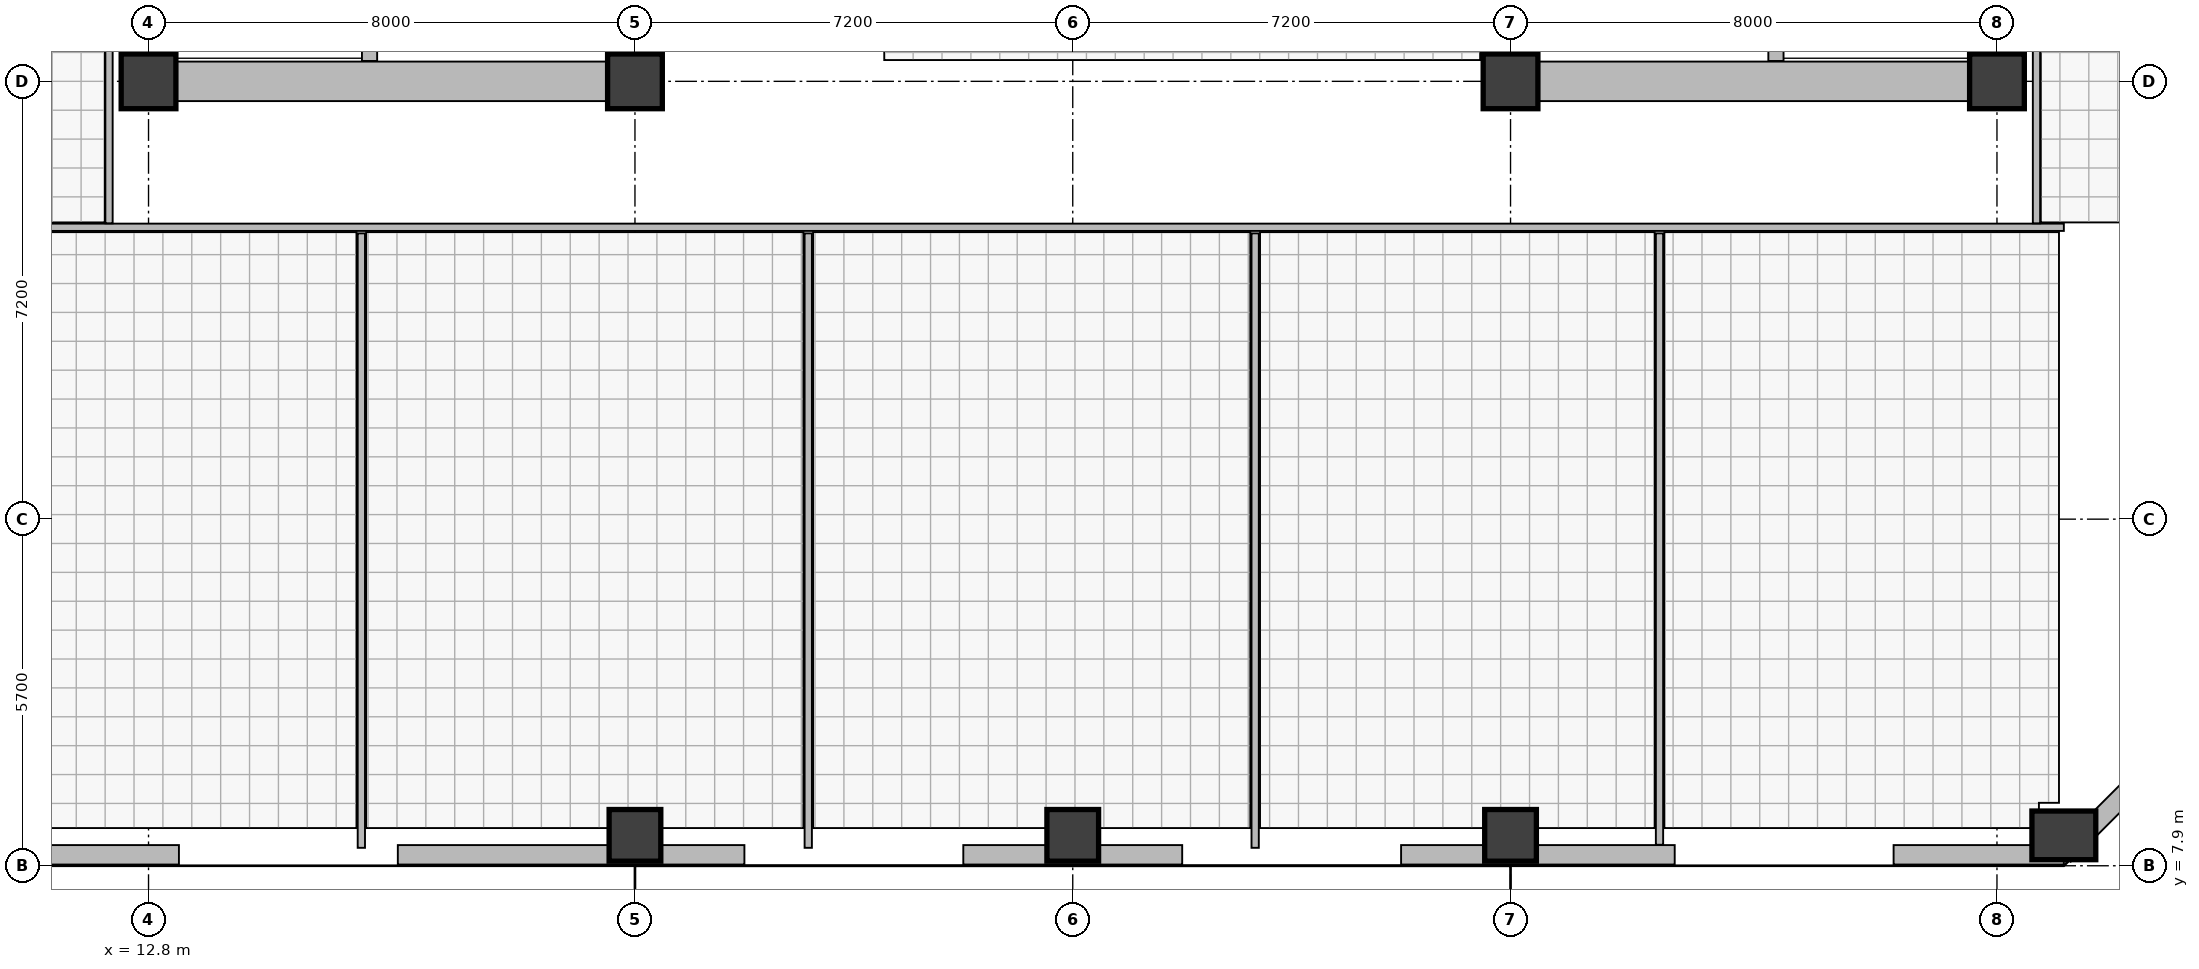
"""IFC4 building model, lengths in metres.
Left out: names, types, materials, properties, quantities, classifications, styles, units other than length and angle.
Written with IfcOpenShell. Run it as: python <this file> out.ifc"""

import sys

from ifc_helpers import new_model, si_unit, direction, frame, frame_2d, origin, origin_2d, place, context, subcontext, project, spatial, rectangle, extrude, element, fill, save


model = new_model("IFC4")
c1 = context("Model", 3, precision=1e-05, world=origin(), true_north=direction((0.0, 1.0)))
c2 = subcontext(c1, "Body", "Model", "MODEL_VIEW")
j1 = project(units=[si_unit("LENGTHUNIT", "METRE"), si_unit("PLANEANGLEUNIT", "RADIAN")], contexts=[c1])
p1 = place(None, origin())
s1 = spatial("IfcSite", under=j1, at=p1, CompositionType="ELEMENT")
p2 = place(p1, origin())
s2 = spatial("IfcBuilding", under=s1, at=p2, CompositionType="ELEMENT")
p3 = place(p2, frame((0.0, 0.0, 202.7)))
s3 = spatial("IfcBuildingStorey", under=s2, at=p3, CompositionType="ELEMENT", Elevation=202.7)
for number, where, z_axis, x_axis in (
    (1, (12.8, 20.8, 0.0), (0.0, 0.0, 1.0), (1.0, 0.0, 0.0)),
    (2, (20.8, 20.8, 0.0), (0.0, 0.0, 1.0), (1.0, 0.0, 0.0)),
    (3, (35.2, 20.8, 0.0), (0.0, 0.0, 1.0), (1.0, 0.0, 0.0)),
    (4, (43.2, 20.8, 0.0), (0.0, 0.0, 1.0), (1.0, 0.0, 0.0)),
):
    element("IfcColumn", number, at=place(p3, frame(where, z_axis=z_axis, x_axis=x_axis)), inside=s3, PredefinedType="COLUMN", context=c2, shape_type="SweptSolid", body=[
        extrude(rectangle(XDim=0.9, YDim=0.9, at=origin_2d()), origin(), (0.0, 0.0, 1.0), 4.8),
    ])
for number, where, z_axis, x_axis in (
    (5, (20.8, 8.4, 0.0), (0.0, 0.0, 1.0), (1.0, 0.0, 0.0)),
    (6, (28.0, 8.4, 0.0), (0.0, 0.0, 1.0), (1.0, 0.0, 0.0)),
    (7, (35.2, 8.4, 0.0), (0.0, 0.0, 1.0), (1.0, 0.0, 0.0)),
):
    element("IfcColumn", number, at=place(p3, frame(where, z_axis=z_axis, x_axis=x_axis)), inside=s3, PredefinedType="COLUMN", context=c2, shape_type="SweptSolid", body=[
        extrude(rectangle(XDim=0.85, YDim=0.85, at=origin_2d()), origin(), (0.0, 0.0, 1.0), 4.8),
    ])
p4 = place(p3, frame((44.3, 8.4, 0.0), z_axis=(0.0, 0.0, 1.0), x_axis=(1.0, 0.0, 0.0)))
e8 = element("IfcColumn", 8, at=p4, inside=s3, PredefinedType="COLUMN", context=c2, shape_type="SweptSolid", body=[
    extrude(rectangle(XDim=0.8, YDim=1.05, at=origin_2d()), origin(), (0.0, 0.0, 1.0), 4.8),
])
p5 = place(p3, frame((44.3, 8.08, 0.0), z_axis=(0.0, 0.0, 1.0), x_axis=(-1.0, 0.0, 0.0)))
e9 = element("IfcWall", 9, at=p5, inside=s3, PredefinedType="STANDARD", context=c2, shape_type="SweptSolid", body=[
    extrude(rectangle(XDim=2.8, YDim=0.32, at=frame_2d((1.4, 0.0))), origin(), (0.0, 0.0, 1.0), 3.735),
])
p6 = place(p3, frame((37.9, 8.08, 0.0), z_axis=(0.0, 0.0, 1.0), x_axis=(-1.0, 0.0, 0.0)))
e10 = element("IfcWall", 10, at=p6, inside=s3, PredefinedType="STANDARD", context=c2, shape_type="SweptSolid", body=[
    extrude(rectangle(XDim=4.5, YDim=0.32, at=frame_2d((2.25, 0.0))), origin(), (0.0, 0.0, 1.0), 3.735),
])
p7 = place(p3, frame((29.8, 8.08, 0.0), z_axis=(0.0, 0.0, 1.0), x_axis=(-1.0, 0.0, 0.0)))
e11 = element("IfcWall", 11, at=p7, inside=s3, PredefinedType="STANDARD", context=c2, shape_type="SweptSolid", body=[
    extrude(rectangle(XDim=3.6, YDim=0.32, at=frame_2d((1.8, 0.0))), origin(), (0.0, 0.0, 1.0), 3.735),
])
p8 = place(p3, frame((22.6, 8.08, 0.0), z_axis=(0.0, 0.0, 1.0), x_axis=(-1.0, 0.0, 0.0)))
e12 = element("IfcWall", 12, at=p8, inside=s3, PredefinedType="STANDARD", context=c2, shape_type="SweptSolid", body=[
    extrude(rectangle(XDim=5.7, YDim=0.32, at=frame_2d((2.85, 0.0))), origin(), (0.0, 0.0, 1.0), 3.735),
])
p9 = place(p3, frame((13.3, 8.08, 0.0), z_axis=(0.0, 0.0, 1.0), x_axis=(-1.0, 0.0, 0.0)))
e13 = element("IfcWall", 13, at=p9, inside=s3, PredefinedType="STANDARD", context=c2, shape_type="SweptSolid", body=[
    extrude(rectangle(XDim=4.0, YDim=0.32, at=frame_2d((2.0, 0.0))), origin(), (0.0, 0.0, 1.0), 3.735),
])
p10 = place(p3, frame((49.12, 12.9, 0.0), z_axis=(0.0, 0.0, 1.0), x_axis=(-0.707124689198, -0.707088872722, 0.0)))
e14 = element("IfcWall", 14, at=p10, inside=s3, PredefinedType="STANDARD", context=c2, shape_type="SweptSolid", body=[
    extrude(rectangle(XDim=6.816, YDim=0.32, at=frame_2d((3.408, 0.0))), origin(), (0.0, 0.0, 1.0), 3.735),
])
p11 = place(p3, frame((12.8, 21.255, 0.0), z_axis=(0.0, 0.0, 1.0), x_axis=(0.0, 1.0, 0.0)))
e15 = element("IfcWall", 15, at=p11, inside=s3, PredefinedType="SHEAR", context=c2, shape_type="SweptSolid", body=[
    extrude(rectangle(XDim=11.89, YDim=0.65, at=frame_2d((5.945, 0.0))), origin(), (0.0, 0.0, 1.0), 4.35),
])
p12 = place(p3, frame((13.255, 20.8, 0.0), z_axis=(0.0, 0.0, 1.0), x_axis=(1.0, 0.0, 0.0)))
e16 = element("IfcWall", 16, at=p12, inside=s3, PredefinedType="SHEAR", context=c2, shape_type="SweptSolid", body=[
    extrude(rectangle(XDim=7.09, YDim=0.65, at=frame_2d((3.545, 0.0))), origin(), (0.0, 0.0, 1.0), 4.35),
])
p13 = place(p3, frame((20.8, 21.255, 0.0), z_axis=(0.0, 0.0, 1.0), x_axis=(0.0, 1.0, 0.0)))
e17 = element("IfcWall", 17, at=p13, inside=s3, PredefinedType="SHEAR", context=c2, shape_type="SweptSolid", body=[
    extrude(rectangle(XDim=3.795, YDim=0.65, at=frame_2d((1.897, 0.0))), origin(), (0.0, 0.0, 1.0), 4.35),
])
p14 = place(p13, frame((1.345, 0.0, 0.0)))
e18 = element("IfcOpeningElement", 18, at=p14, cuts=e17, PredefinedType="OPENING", context=c2, shape_type="SweptSolid", body=[
    extrude(rectangle(XDim=1.2, YDim=2.15, at=frame_2d((0.6, 1.075))), frame((0.0, 0.335, 0.0), z_axis=(0.0, -1.0, 0.0), x_axis=(1.0, 0.0, 0.0)), (0.0, 0.0, 1.0), 0.67),
])
p15 = place(p3, frame((16.435, 21.135, 0.0), z_axis=(0.0, 0.0, 1.0), x_axis=(0.0, 1.0, 0.0)))
e19 = element("IfcWall", 19, at=p15, inside=s3, PredefinedType="SHEAR", context=c2, shape_type="SweptSolid", body=[
    extrude(rectangle(XDim=12.13, YDim=0.25, at=frame_2d((6.065, 0.0))), origin(), (0.0, 0.0, 1.0), 4.35),
])
p16 = place(p15, frame((0.515, 0.0, 0.0)))
e20 = element("IfcOpeningElement", 20, at=p16, cuts=e19, PredefinedType="OPENING", context=c2, shape_type="SweptSolid", body=[
    extrude(rectangle(XDim=1.2, YDim=2.15, at=frame_2d((0.6, 1.075))), frame((0.0, 0.135, 0.0), z_axis=(0.0, -1.0, 0.0), x_axis=(1.0, 0.0, 0.0)), (0.0, 0.0, 1.0), 0.27),
])
p17 = place(p15, frame((2.665, 0.0, 0.0)))
e21 = element("IfcOpeningElement", 21, at=p17, cuts=e19, PredefinedType="OPENING", context=c2, shape_type="SweptSolid", body=[
    extrude(rectangle(XDim=1.15, YDim=2.15, at=frame_2d((0.575, 1.075))), frame((0.0, 0.135, 0.0), z_axis=(0.0, -1.0, 0.0), x_axis=(1.0, 0.0, 0.0)), (0.0, 0.0, 1.0), 0.27),
])
p18 = place(p3, frame((43.2, 21.255, 0.0), z_axis=(0.0, 0.0, 1.0), x_axis=(0.0, 1.0, 0.0)))
e22 = element("IfcWall", 22, at=p18, inside=s3, PredefinedType="SHEAR", context=c2, shape_type="SweptSolid", body=[
    extrude(rectangle(XDim=11.89, YDim=0.65, at=frame_2d((5.945, 0.0))), origin(), (0.0, 0.0, 1.0), 4.35),
])
p19 = place(p3, frame((35.655, 20.8, 0.0), z_axis=(0.0, 0.0, 1.0), x_axis=(1.0, 0.0, 0.0)))
e23 = element("IfcWall", 23, at=p19, inside=s3, PredefinedType="SHEAR", context=c2, shape_type="SweptSolid", body=[
    extrude(rectangle(XDim=7.09, YDim=0.65, at=frame_2d((3.545, 0.0))), origin(), (0.0, 0.0, 1.0), 4.35),
])
p20 = place(p3, frame((35.2, 21.255, 0.0), z_axis=(0.0, 0.0, 1.0), x_axis=(0.0, 1.0, 0.0)))
e24 = element("IfcWall", 24, at=p20, inside=s3, PredefinedType="SHEAR", context=c2, shape_type="SweptSolid", body=[
    extrude(rectangle(XDim=11.89, YDim=0.65, at=frame_2d((5.945, 0.0))), origin(), (0.0, 0.0, 1.0), 4.35),
])
p21 = place(p20, frame((1.345, 0.0, 0.0)))
e25 = element("IfcOpeningElement", 25, at=p21, cuts=e24, PredefinedType="OPENING", context=c2, shape_type="SweptSolid", body=[
    extrude(rectangle(XDim=1.2, YDim=2.15, at=frame_2d((0.6, 1.075))), frame((0.0, 0.335, 0.0), z_axis=(0.0, -1.0, 0.0), x_axis=(1.0, 0.0, 0.0)), (0.0, 0.0, 1.0), 0.67),
])
p22 = place(p20, frame((4.345, 0.0, 0.0)))
e26 = element("IfcOpeningElement", 26, at=p22, cuts=e24, PredefinedType="OPENING", context=c2, shape_type="SweptSolid", body=[
    extrude(rectangle(XDim=1.1, YDim=2.1, at=frame_2d((0.55, 1.05))), frame((0.0, 0.335, 0.0), z_axis=(0.0, -1.0, 0.0), x_axis=(1.0, 0.0, 0.0)), (0.0, 0.0, 1.0), 0.67),
])
p23 = place(p20, frame((6.295, 0.0, 0.0)))
e27 = element("IfcOpeningElement", 27, at=p23, cuts=e24, PredefinedType="OPENING", context=c2, shape_type="SweptSolid", body=[
    extrude(rectangle(XDim=1.1, YDim=2.1, at=frame_2d((0.55, 1.05))), frame((0.0, 0.335, 0.0), z_axis=(0.0, -1.0, 0.0), x_axis=(1.0, 0.0, 0.0)), (0.0, 0.0, 1.0), 0.67),
])
p24 = place(p20, frame((8.245, 0.0, 0.0)))
e28 = element("IfcOpeningElement", 28, at=p24, cuts=e24, PredefinedType="OPENING", context=c2, shape_type="SweptSolid", body=[
    extrude(rectangle(XDim=1.1, YDim=2.1, at=frame_2d((0.55, 1.05))), frame((0.0, 0.335, 0.0), z_axis=(0.0, -1.0, 0.0), x_axis=(1.0, 0.0, 0.0)), (0.0, 0.0, 1.0), 0.67),
])
p25 = place(p20, frame((10.445, 0.0, 0.0)))
e29 = element("IfcOpeningElement", 29, at=p25, cuts=e24, PredefinedType="OPENING", context=c2, shape_type="SweptSolid", body=[
    extrude(rectangle(XDim=1.1, YDim=2.1, at=frame_2d((0.55, 1.05))), frame((0.0, 0.335, 0.0), z_axis=(0.0, -1.0, 0.0), x_axis=(1.0, 0.0, 0.0)), (0.0, 0.0, 1.0), 0.67),
])
p26 = place(p3, frame((39.565, 21.135, 0.0), z_axis=(0.0, 0.0, 1.0), x_axis=(0.0, 1.0, 0.0)))
e30 = element("IfcWall", 30, at=p26, inside=s3, PredefinedType="SHEAR", context=c2, shape_type="SweptSolid", body=[
    extrude(rectangle(XDim=12.13, YDim=0.25, at=frame_2d((6.065, 0.0))), origin(), (0.0, 0.0, 1.0), 4.35),
])
p27 = place(p26, frame((0.515, 0.0, 0.0)))
e31 = element("IfcOpeningElement", 31, at=p27, cuts=e30, PredefinedType="OPENING", context=c2, shape_type="SweptSolid", body=[
    extrude(rectangle(XDim=1.2, YDim=2.15, at=frame_2d((0.6, 1.075))), frame((0.0, 0.135, 0.0), z_axis=(0.0, -1.0, 0.0), x_axis=(1.0, 0.0, 0.0)), (0.0, 0.0, 1.0), 0.27),
])
p28 = place(p26, frame((2.665, 0.0, 0.0)))
e32 = element("IfcOpeningElement", 32, at=p28, cuts=e30, PredefinedType="OPENING", context=c2, shape_type="SweptSolid", body=[
    extrude(rectangle(XDim=1.15, YDim=2.15, at=frame_2d((0.575, 1.075))), frame((0.0, 0.135, 0.0), z_axis=(0.0, -1.0, 0.0), x_axis=(1.0, 0.0, 0.0)), (0.0, 0.0, 1.0), 0.27),
])
p29 = place(p3, frame((9.3, 18.4, 0.0), z_axis=(0.0, 0.0, 1.0), x_axis=(1.0, 0.0, 0.0)))
e33 = element("IfcWall", 33, at=p29, inside=s3, PredefinedType="PARTITIONING", context=c2, shape_type="SweptSolid", body=[
    extrude(rectangle(XDim=35.0, YDim=0.12, at=frame_2d((17.5, 0.0))), origin(), (0.0, 0.0, 1.0), 4.35),
])
p30 = place(p29, frame((2.2, 0.0, 0.0)))
e34 = element("IfcOpeningElement", 34, at=p30, cuts=e33, PredefinedType="OPENING", context=c2, shape_type="SweptSolid", body=[
    extrude(rectangle(XDim=1.0, YDim=2.1, at=frame_2d((0.5, 1.05))), frame((0.0, 0.07, 0.0), z_axis=(0.0, -1.0, 0.0), x_axis=(1.0, 0.0, 0.0)), (0.0, 0.0, 1.0), 0.14),
])
p31 = place(p29, frame((9.2, 0.0, 0.0)))
e35 = element("IfcOpeningElement", 35, at=p31, cuts=e33, PredefinedType="OPENING", context=c2, shape_type="SweptSolid", body=[
    extrude(rectangle(XDim=1.0, YDim=2.1, at=frame_2d((0.5, 1.05))), frame((0.0, 0.07, 0.0), z_axis=(0.0, -1.0, 0.0), x_axis=(1.0, 0.0, 0.0)), (0.0, 0.0, 1.0), 0.14),
])
p32 = place(p29, frame((16.55, 0.0, 0.0)))
e36 = element("IfcOpeningElement", 36, at=p32, cuts=e33, PredefinedType="OPENING", context=c2, shape_type="SweptSolid", body=[
    extrude(rectangle(XDim=1.0, YDim=2.1, at=frame_2d((0.5, 1.05))), frame((0.0, 0.07, 0.0), z_axis=(0.0, -1.0, 0.0), x_axis=(1.0, 0.0, 0.0)), (0.0, 0.0, 1.0), 0.14),
])
p33 = place(p29, frame((23.9, 0.0, 0.0)))
e37 = element("IfcOpeningElement", 37, at=p33, cuts=e33, PredefinedType="OPENING", context=c2, shape_type="SweptSolid", body=[
    extrude(rectangle(XDim=1.0, YDim=2.1, at=frame_2d((0.5, 1.05))), frame((0.0, 0.07, 0.0), z_axis=(0.0, -1.0, 0.0), x_axis=(1.0, 0.0, 0.0)), (0.0, 0.0, 1.0), 0.14),
])
p34 = place(p29, frame((30.55, 0.0, 0.0)))
e38 = element("IfcOpeningElement", 38, at=p34, cuts=e33, PredefinedType="OPENING", context=c2, shape_type="SweptSolid", body=[
    extrude(rectangle(XDim=1.0, YDim=2.1, at=frame_2d((0.5, 1.05))), frame((0.0, 0.07, 0.0), z_axis=(0.0, -1.0, 0.0), x_axis=(1.0, 0.0, 0.0)), (0.0, 0.0, 1.0), 0.14),
])
p35 = place(p3, frame((16.3, 8.195, 0.0), z_axis=(0.0, 0.0, 1.0), x_axis=(0.0, 1.0, 0.0)))
e39 = element("IfcWall", 39, at=p35, inside=s3, PredefinedType="PARTITIONING", context=c2, shape_type="SweptSolid", body=[
    extrude(rectangle(XDim=10.105, YDim=0.12, at=frame_2d((5.052, 0.0))), origin(), (0.0, 0.0, 1.0), 3.785),
])
for number, where, z_axis, x_axis in (
    (40, (23.65, 8.195, 0.0), (0.0, 0.0, 1.0), (0.0, 1.0, 0.0)),
    (41, (31.0, 8.195, 0.0), (0.0, 0.0, 1.0), (0.0, 1.0, 0.0)),
):
    element("IfcWall", number, at=place(p3, frame(where, z_axis=z_axis, x_axis=x_axis)), inside=s3, PredefinedType="PARTITIONING", context=c2, shape_type="SweptSolid", body=[
        extrude(rectangle(XDim=10.105, YDim=0.12, at=frame_2d((5.052, 0.0))), origin(), (0.0, 0.0, 1.0), 4.35),
    ])
p36 = place(p3, frame((37.65, 8.245, 0.0), z_axis=(0.0, 0.0, 1.0), x_axis=(0.0, 1.0, 0.0)))
e42 = element("IfcWall", 42, at=p36, inside=s3, PredefinedType="PARTITIONING", context=c2, shape_type="SweptSolid", body=[
    extrude(rectangle(XDim=10.055, YDim=0.12, at=frame_2d((5.027, 0.0))), origin(), (0.0, 0.0, 1.0), 4.35),
])
p37 = place(p3, frame((12.15, 18.465, 0.0), z_axis=(0.0, 0.0, 1.0), x_axis=(0.0, 1.0, 0.0)))
e43 = element("IfcWall", 43, at=p37, inside=s3, PredefinedType="PARTITIONING", context=c2, shape_type="SweptSolid", body=[
    extrude(rectangle(XDim=17.67, YDim=0.12, at=frame_2d((8.835, 0.0))), origin(), (0.0, 0.0, 1.0), 4.35),
])
p38 = place(p37, frame((0.385, 0.0, 0.0)))
e44 = element("IfcOpeningElement", 44, at=p38, cuts=e43, PredefinedType="OPENING", context=c2, shape_type="SweptSolid", body=[
    extrude(rectangle(XDim=1.1, YDim=2.15, at=frame_2d((0.55, 1.075))), frame((0.0, 0.07, 0.0), z_axis=(0.0, -1.0, 0.0), x_axis=(1.0, 0.0, 0.0)), (0.0, 0.0, 1.0), 0.14),
])
p39 = place(p3, frame((43.85, 18.465, 0.0), z_axis=(0.0, 0.0, 1.0), x_axis=(0.0, 1.0, 0.0)))
e45 = element("IfcWall", 45, at=p39, inside=s3, PredefinedType="PARTITIONING", context=c2, shape_type="SweptSolid", body=[
    extrude(rectangle(XDim=17.67, YDim=0.12, at=frame_2d((8.835, 0.0))), origin(), (0.0, 0.0, 1.0), 4.35),
])
p40 = place(p39, frame((0.385, 0.0, 0.0)))
e46 = element("IfcOpeningElement", 46, at=p40, cuts=e45, PredefinedType="OPENING", context=c2, shape_type="SweptSolid", body=[
    extrude(rectangle(XDim=1.1, YDim=2.15, at=frame_2d((0.55, 1.075))), frame((0.0, 0.07, 0.0), z_axis=(0.0, -1.0, 0.0), x_axis=(1.0, 0.0, 0.0)), (0.0, 0.0, 1.0), 0.14),
])
p41 = place(p30, origin())
e47 = element("IfcDoor", 47, at=p41, inside=s3, OperationType="SINGLE_SWING_RIGHT", PredefinedType="DOOR", context=c2, shape_type="SweptSolid", body=[
    extrude(rectangle(XDim=1.0, YDim=2.1, at=frame_2d((0.5, 1.05))), frame((0.0, 0.025, 0.0), z_axis=(0.0, -1.0, 0.0), x_axis=(1.0, 0.0, 0.0)), (0.0, 0.0, 1.0), 0.05),
])
fill(e34, e47)
p42 = place(p31, origin())
e48 = element("IfcDoor", 48, at=p42, inside=s3, OperationType="SINGLE_SWING_LEFT", PredefinedType="DOOR", context=c2, shape_type="SweptSolid", body=[
    extrude(rectangle(XDim=1.0, YDim=2.1, at=frame_2d((0.5, 1.05))), frame((0.0, 0.025, 0.0), z_axis=(0.0, -1.0, 0.0), x_axis=(1.0, 0.0, 0.0)), (0.0, 0.0, 1.0), 0.05),
])
fill(e35, e48)
p43 = place(p32, origin())
e49 = element("IfcDoor", 49, at=p43, inside=s3, OperationType="SINGLE_SWING_RIGHT", PredefinedType="DOOR", context=c2, shape_type="SweptSolid", body=[
    extrude(rectangle(XDim=1.0, YDim=2.1, at=frame_2d((0.5, 1.05))), frame((0.0, 0.025, 0.0), z_axis=(0.0, -1.0, 0.0), x_axis=(1.0, 0.0, 0.0)), (0.0, 0.0, 1.0), 0.05),
])
fill(e36, e49)
p44 = place(p33, origin())
e50 = element("IfcDoor", 50, at=p44, inside=s3, OperationType="SINGLE_SWING_LEFT", PredefinedType="DOOR", context=c2, shape_type="SweptSolid", body=[
    extrude(rectangle(XDim=1.0, YDim=2.1, at=frame_2d((0.5, 1.05))), frame((0.0, 0.025, 0.0), z_axis=(0.0, -1.0, 0.0), x_axis=(1.0, 0.0, 0.0)), (0.0, 0.0, 1.0), 0.05),
])
fill(e37, e50)
p45 = place(p34, origin())
e51 = element("IfcDoor", 51, at=p45, inside=s3, OperationType="SINGLE_SWING_RIGHT", PredefinedType="DOOR", context=c2, shape_type="SweptSolid", body=[
    extrude(rectangle(XDim=1.0, YDim=2.1, at=frame_2d((0.5, 1.05))), frame((0.0, 0.025, 0.0), z_axis=(0.0, -1.0, 0.0), x_axis=(1.0, 0.0, 0.0)), (0.0, 0.0, 1.0), 0.05),
])
fill(e38, e51)
p46 = place(p38, origin())
e52 = element("IfcDoor", 52, at=p46, inside=s3, OperationType="SINGLE_SWING_RIGHT", PredefinedType="DOOR", context=c2, shape_type="SweptSolid", body=[
    extrude(rectangle(XDim=1.1, YDim=2.15, at=frame_2d((0.55, 1.075))), frame((0.0, 0.025, 0.0), z_axis=(0.0, -1.0, 0.0), x_axis=(1.0, 0.0, 0.0)), (0.0, 0.0, 1.0), 0.05),
])
fill(e44, e52)
p47 = place(p40, origin())
e53 = element("IfcDoor", 53, at=p47, inside=s3, OperationType="SINGLE_SWING_LEFT", PredefinedType="DOOR", context=c2, shape_type="SweptSolid", body=[
    extrude(rectangle(XDim=1.1, YDim=2.15, at=frame_2d((0.55, 1.075))), frame((0.0, 0.025, 0.0), z_axis=(0.0, -1.0, 0.0), x_axis=(1.0, 0.0, 0.0)), (0.0, 0.0, 1.0), 0.05),
])
fill(e46, e53)
save(model, sys.argv[1])
